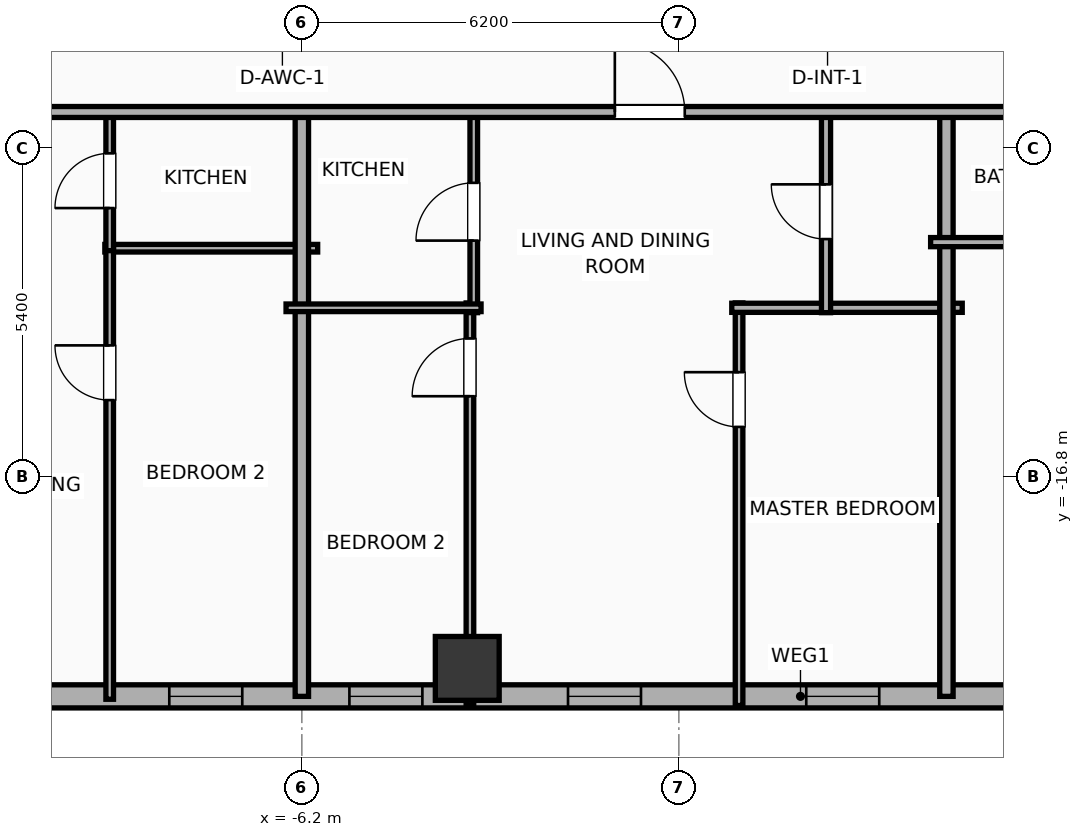
"""IFC4 building model, lengths in metres.
Left out: names, types, materials, properties, quantities, classifications, styles, units other than length and angle.
Written with IfcOpenShell. Run it as: python <this file> out.ifc"""

import sys

from ifc_helpers import new_model, si_unit, direction, frame, frame_2d, origin, origin_2d, place, context, subcontext, project, spatial, rectangle, hollow_rectangle, extrude, element, fill, save


model = new_model("IFC4")
c1 = context("Model", 3, precision=1e-05, world=origin(), true_north=direction((0.0, 1.0)))
c2 = subcontext(c1, "Body", "Model", "MODEL_VIEW")
j1 = project(units=[si_unit("LENGTHUNIT", "METRE"), si_unit("PLANEANGLEUNIT", "RADIAN")], contexts=[c1])
p1 = place(None, origin())
s1 = spatial("IfcSite", under=j1, at=p1, CompositionType="ELEMENT")
p2 = place(p1, origin())
s2 = spatial("IfcBuilding", under=s1, at=p2, CompositionType="ELEMENT")
p3 = place(p2, frame((0.0, 0.0, 132.6)))
s3 = spatial("IfcBuildingStorey", under=s2, at=p3, CompositionType="ELEMENT", Elevation=132.6)
p4 = place(p3, frame((-3.48, -19.95, 0.0), z_axis=(0.0, 0.0, 1.0), x_axis=(1.0, 0.0, 0.0)))
e1 = element("IfcColumn", 1, at=p4, inside=s3, PredefinedType="COLUMN", context=c2, shape_type="SweptSolid", body=[
    extrude(hollow_rectangle(XDim=1.05, YDim=1.05, WallThickness=0.036, at=origin_2d()), origin(), (0.0, 0.0, 1.0), 3.9),
])
p5 = place(p3, frame((29.381, -20.41, 0.0), z_axis=(0.0, 0.0, 1.0), x_axis=(-1.0, 0.0, 0.0)))
e2 = element("IfcWall", 2, at=p5, inside=s3, PredefinedType="ELEMENTEDWALL", context=c2, shape_type="SweptSolid", body=[
    extrude(rectangle(XDim=54.763, YDim=0.38, at=frame_2d((27.381, 0.0))), origin(), (0.0, 0.0, 1.0), 3.65),
])
p6 = place(p5, frame((3.995, 0.0, 0.75)))
e3 = element("IfcOpeningElement", 3, at=p6, cuts=e2, PredefinedType="OPENING", context=c2, shape_type="SweptSolid", body=[
    extrude(rectangle(XDim=2.4, YDim=2.1, at=frame_2d((1.2, 1.05))), frame((0.0, 0.2, 0.0), z_axis=(0.0, -1.0, 0.0), x_axis=(1.0, 0.0, 0.0)), (0.0, 0.0, 1.0), 0.4),
])
p7 = place(p5, frame((18.486, 0.0, 0.75)))
e4 = element("IfcOpeningElement", 4, at=p7, cuts=e2, PredefinedType="OPENING", context=c2, shape_type="SweptSolid", body=[
    extrude(rectangle(XDim=2.4, YDim=2.1, at=frame_2d((1.2, 1.05))), frame((0.0, 0.2, 0.0), z_axis=(0.0, -1.0, 0.0), x_axis=(1.0, 0.0, 0.0)), (0.0, 0.0, 1.0), 0.4),
])
p8 = place(p5, frame((46.717, 0.0, 0.75)))
e5 = element("IfcOpeningElement", 5, at=p8, cuts=e2, PredefinedType="OPENING", context=c2, shape_type="SweptSolid", body=[
    extrude(rectangle(XDim=2.4, YDim=2.1, at=frame_2d((1.2, 1.05))), frame((0.0, 0.2, 0.0), z_axis=(0.0, -1.0, 0.0), x_axis=(1.0, 0.0, 0.0)), (0.0, 0.0, 1.0), 0.4),
])
p9 = place(p5, frame((52.651, 0.0, 0.75)))
e6 = element("IfcOpeningElement", 6, at=p9, cuts=e2, PredefinedType="OPENING", context=c2, shape_type="SweptSolid", body=[
    extrude(rectangle(XDim=1.2, YDim=2.05, at=frame_2d((0.6, 1.025))), frame((0.0, 0.2, 0.0), z_axis=(0.0, -1.0, 0.0), x_axis=(1.0, 0.0, 0.0)), (0.0, 0.0, 1.0), 0.4),
])
p10 = place(p5, frame((50.521, 0.0, 0.75)))
e7 = element("IfcOpeningElement", 7, at=p10, cuts=e2, PredefinedType="OPENING", context=c2, shape_type="SweptSolid", body=[
    extrude(rectangle(XDim=1.2, YDim=2.05, at=frame_2d((0.6, 1.025))), frame((0.0, 0.2, 0.0), z_axis=(0.0, -1.0, 0.0), x_axis=(1.0, 0.0, 0.0)), (0.0, 0.0, 1.0), 0.4),
])
p11 = place(p5, frame((40.191, 0.0, 0.75)))
e8 = element("IfcOpeningElement", 8, at=p11, cuts=e2, PredefinedType="OPENING", context=c2, shape_type="SweptSolid", body=[
    extrude(rectangle(XDim=1.2, YDim=2.05, at=frame_2d((0.6, 1.025))), frame((0.0, 0.2, 0.0), z_axis=(0.0, -1.0, 0.0), x_axis=(1.0, 0.0, 0.0)), (0.0, 0.0, 1.0), 0.4),
])
p12 = place(p5, frame((44.631, 0.0, 0.75)))
e9 = element("IfcOpeningElement", 9, at=p12, cuts=e2, PredefinedType="OPENING", context=c2, shape_type="SweptSolid", body=[
    extrude(rectangle(XDim=1.2, YDim=2.05, at=frame_2d((0.6, 1.025))), frame((0.0, 0.2, 0.0), z_axis=(0.0, -1.0, 0.0), x_axis=(1.0, 0.0, 0.0)), (0.0, 0.0, 1.0), 0.4),
])
p13 = place(p5, frame((36.561, 0.0, 0.75)))
e10 = element("IfcOpeningElement", 10, at=p13, cuts=e2, PredefinedType="OPENING", context=c2, shape_type="SweptSolid", body=[
    extrude(rectangle(XDim=1.2, YDim=2.05, at=frame_2d((0.6, 1.025))), frame((0.0, 0.2, 0.0), z_axis=(0.0, -1.0, 0.0), x_axis=(1.0, 0.0, 0.0)), (0.0, 0.0, 1.0), 0.4),
])
p14 = place(p5, frame((30.004, 0.0, 0.75)))
e11 = element("IfcOpeningElement", 11, at=p14, cuts=e2, PredefinedType="OPENING", context=c2, shape_type="SweptSolid", body=[
    extrude(rectangle(XDim=1.2, YDim=2.05, at=frame_2d((0.6, 1.025))), frame((0.0, 0.2, 0.0), z_axis=(0.0, -1.0, 0.0), x_axis=(1.0, 0.0, 0.0)), (0.0, 0.0, 1.0), 0.4),
])
p15 = place(p5, frame((33.599, 0.0, 0.75)))
e12 = element("IfcOpeningElement", 12, at=p15, cuts=e2, PredefinedType="OPENING", context=c2, shape_type="SweptSolid", body=[
    extrude(rectangle(XDim=1.2, YDim=2.05, at=frame_2d((0.6, 1.025))), frame((0.0, 0.2, 0.0), z_axis=(0.0, -1.0, 0.0), x_axis=(1.0, 0.0, 0.0)), (0.0, 0.0, 1.0), 0.4),
])
p16 = place(p5, frame((26.086, 0.0, 0.75)))
e13 = element("IfcOpeningElement", 13, at=p16, cuts=e2, PredefinedType="OPENING", context=c2, shape_type="SweptSolid", body=[
    extrude(rectangle(XDim=1.2, YDim=2.05, at=frame_2d((0.6, 1.025))), frame((0.0, 0.2, 0.0), z_axis=(0.0, -1.0, 0.0), x_axis=(1.0, 0.0, 0.0)), (0.0, 0.0, 1.0), 0.4),
])
p17 = place(p5, frame((22.626, 0.0, 0.75)))
e14 = element("IfcOpeningElement", 14, at=p17, cuts=e2, PredefinedType="OPENING", context=c2, shape_type="SweptSolid", body=[
    extrude(rectangle(XDim=1.2, YDim=2.05, at=frame_2d((0.6, 1.025))), frame((0.0, 0.2, 0.0), z_axis=(0.0, -1.0, 0.0), x_axis=(1.0, 0.0, 0.0)), (0.0, 0.0, 1.0), 0.4),
])
p18 = place(p5, frame((15.361, 0.0, 0.75)))
e15 = element("IfcOpeningElement", 15, at=p18, cuts=e2, PredefinedType="OPENING", context=c2, shape_type="SweptSolid", body=[
    extrude(rectangle(XDim=1.2, YDim=2.05, at=frame_2d((0.6, 1.025))), frame((0.0, 0.2, 0.0), z_axis=(0.0, -1.0, 0.0), x_axis=(1.0, 0.0, 0.0)), (0.0, 0.0, 1.0), 0.4),
])
p19 = place(p5, frame((8.986, 0.0, 0.75)))
e16 = element("IfcOpeningElement", 16, at=p19, cuts=e2, PredefinedType="OPENING", context=c2, shape_type="SweptSolid", body=[
    extrude(rectangle(XDim=1.2, YDim=2.05, at=frame_2d((0.6, 1.025))), frame((0.0, 0.2, 0.0), z_axis=(0.0, -1.0, 0.0), x_axis=(1.0, 0.0, 0.0)), (0.0, 0.0, 1.0), 0.4),
])
p20 = place(p5, frame((1.736, 0.0, 0.75)))
e17 = element("IfcOpeningElement", 17, at=p20, cuts=e2, PredefinedType="OPENING", context=c2, shape_type="SweptSolid", body=[
    extrude(rectangle(XDim=1.2, YDim=2.05, at=frame_2d((0.6, 1.025))), frame((0.0, 0.2, 0.0), z_axis=(0.0, -1.0, 0.0), x_axis=(1.0, 0.0, 0.0)), (0.0, 0.0, 1.0), 0.4),
])
p21 = place(p3, frame((-9.44, -13.04, 0.0), z_axis=(0.0, 0.0, 1.0), x_axis=(1.0, 0.0, 0.0)))
e18 = element("IfcWall", 18, at=p21, inside=s3, PredefinedType="PARTITIONING", context=c2, shape_type="SweptSolid", body=[
    extrude(rectangle(XDim=3.5, YDim=0.125, at=frame_2d((1.75, 0.0))), origin(), (0.0, 0.0, 1.0), 3.65),
])
p22 = place(p3, frame((-9.36, -20.458, 0.0), z_axis=(0.0, 0.0, 1.0), x_axis=(0.0, 1.0, 0.0)))
e19 = element("IfcWall", 19, at=p22, inside=s3, PredefinedType="PARTITIONING", context=c2, shape_type="SweptSolid", body=[
    extrude(rectangle(XDim=7.458, YDim=0.125, at=frame_2d((3.729, 0.0))), origin(), (0.0, 0.0, 1.0), 3.65),
])
p23 = place(p22, frame((4.919, 0.0, 0.0)))
e20 = element("IfcOpeningElement", 20, at=p23, cuts=e19, PredefinedType="OPENING", context=c2, shape_type="SweptSolid", body=[
    extrude(rectangle(XDim=0.9, YDim=2.05, at=frame_2d((0.45, 1.025))), frame((0.0, 0.073, 0.0), z_axis=(0.0, -1.0, 0.0), x_axis=(1.0, 0.0, 0.0)), (0.0, 0.0, 1.0), 0.145),
])
p24 = place(p3, frame((-9.36, -13.08, 0.0), z_axis=(0.0, 0.0, 1.0), x_axis=(0.0, 1.0, 0.0)))
e21 = element("IfcWall", 21, at=p24, inside=s3, PredefinedType="PARTITIONING", context=c2, shape_type="SweptSolid", body=[
    extrude(rectangle(XDim=2.3, YDim=0.125, at=frame_2d((1.15, 0.0))), origin(), (0.0, 0.0, 1.0), 3.65),
])
p25 = place(p24, frame((0.7, 0.0, 0.0)))
e22 = element("IfcOpeningElement", 22, at=p25, cuts=e21, PredefinedType="OPENING", context=c2, shape_type="SweptSolid", body=[
    extrude(rectangle(XDim=0.9, YDim=2.05, at=frame_2d((0.45, 1.025))), frame((0.0, 0.073, 0.0), z_axis=(0.0, -1.0, 0.0), x_axis=(1.0, 0.0, 0.0)), (0.0, 0.0, 1.0), 0.145),
])
p26 = place(p3, frame((-6.2, -20.41, 0.0), z_axis=(0.0, 0.0, 1.0), x_axis=(0.0, 1.0, 0.0)))
e23 = element("IfcWall", 23, at=p26, inside=s3, PredefinedType="PARTITIONING", context=c2, shape_type="SweptSolid", body=[
    extrude(rectangle(XDim=9.69, YDim=0.22, at=frame_2d((4.845, 0.0))), origin(), (0.0, 0.0, 1.0), 3.65),
])
p27 = place(p3, frame((-3.436, -20.56, 0.0), z_axis=(0.0, 0.0, 1.0), x_axis=(0.0, 1.0, 0.0)))
e24 = element("IfcWall", 24, at=p27, inside=s3, PredefinedType="PARTITIONING", context=c2, shape_type="SweptSolid", body=[
    extrude(rectangle(XDim=6.62, YDim=0.125, at=frame_2d((3.31, 0.0))), origin(), (0.0, 0.0, 1.0), 3.04),
])
p28 = place(p27, frame((5.086, 0.0, 0.0)))
e25 = element("IfcOpeningElement", 25, at=p28, cuts=e24, PredefinedType="OPENING", context=c2, shape_type="SweptSolid", body=[
    extrude(rectangle(XDim=0.95, YDim=2.05, at=frame_2d((0.475, 1.025))), frame((0.0, 0.073, 0.0), z_axis=(0.0, -1.0, 0.0), x_axis=(1.0, 0.0, 0.0)), (0.0, 0.0, 1.0), 0.145),
])
p29 = place(p3, frame((0.99, -20.56, 0.0), z_axis=(0.0, 0.0, 1.0), x_axis=(0.0, 1.0, 0.0)))
e26 = element("IfcWall", 26, at=p29, inside=s3, PredefinedType="PARTITIONING", context=c2, shape_type="SweptSolid", body=[
    extrude(rectangle(XDim=6.62, YDim=0.125, at=frame_2d((3.31, 0.0))), origin(), (0.0, 0.0, 1.0), 3.65),
])
p30 = place(p29, frame((4.581, 0.0, 0.0)))
e27 = element("IfcOpeningElement", 27, at=p30, cuts=e26, PredefinedType="OPENING", context=c2, shape_type="SweptSolid", body=[
    extrude(rectangle(XDim=0.9, YDim=2.05, at=frame_2d((0.45, 1.025))), frame((0.0, 0.073, 0.0), z_axis=(0.0, -1.0, 0.0), x_axis=(1.0, 0.0, 0.0)), (0.0, 0.0, 1.0), 0.145),
])
p31 = place(p3, frame((0.87, -14.02, 0.0), z_axis=(0.0, 0.0, 1.0), x_axis=(1.0, 0.0, 0.0)))
e28 = element("IfcWall", 28, at=p31, inside=s3, PredefinedType="PLUMBINGWALL", context=c2, shape_type="SweptSolid", body=[
    extrude(rectangle(XDim=3.79, YDim=0.15, at=frame_2d((1.895, 0.0))), origin(), (0.0, 0.0, 1.0), 3.65),
])
p32 = place(p3, frame((-3.373, -14.1, 0.0), z_axis=(0.0, 0.0, 1.0), x_axis=(0.0, 1.0, 0.0)))
e29 = element("IfcWall", 29, at=p32, inside=s3, PredefinedType="PARTITIONING", context=c2, shape_type="SweptSolid", body=[
    extrude(rectangle(XDim=3.32, YDim=0.125, at=frame_2d((1.66, 0.0))), origin(), (0.0, 0.0, 1.0), 3.65),
])
p33 = place(p32, frame((1.185, 0.0, 0.0)))
e30 = element("IfcOpeningElement", 30, at=p33, cuts=e29, PredefinedType="OPENING", context=c2, shape_type="SweptSolid", body=[
    extrude(rectangle(XDim=0.95, YDim=2.05, at=frame_2d((0.475, 1.025))), frame((0.0, 0.073, 0.0), z_axis=(0.0, -1.0, 0.0), x_axis=(1.0, 0.0, 0.0)), (0.0, 0.0, 1.0), 0.145),
])
p34 = place(p3, frame((-6.46, -14.02, 0.0), z_axis=(0.0, 0.0, 1.0), x_axis=(1.0, 0.0, 0.0)))
e31 = element("IfcWall", 31, at=p34, inside=s3, PredefinedType="PARTITIONING", context=c2, shape_type="SweptSolid", body=[
    extrude(rectangle(XDim=3.207, YDim=0.125, at=frame_2d((1.604, 0.0))), origin(), (0.0, 0.0, 1.0), 3.65),
])
p35 = place(p3, frame((2.42, -14.1, 0.0), z_axis=(0.0, 0.0, 1.0), x_axis=(0.0, 1.0, 0.0)))
e32 = element("IfcWall", 32, at=p35, inside=s3, PredefinedType="PLUMBINGWALL", context=c2, shape_type="SweptSolid", body=[
    extrude(rectangle(XDim=3.32, YDim=0.15, at=frame_2d((1.66, 0.0))), origin(), (0.0, 0.0, 1.0), 3.65),
])
p36 = place(p35, frame((1.21, 0.0, 0.0)))
e33 = element("IfcOpeningElement", 33, at=p36, cuts=e32, PredefinedType="OPENING", context=c2, shape_type="SweptSolid", body=[
    extrude(rectangle(XDim=0.9, YDim=2.05, at=frame_2d((0.45, 1.025))), frame((0.0, 0.085, 0.0), z_axis=(0.0, -1.0, 0.0), x_axis=(1.0, 0.0, 0.0)), (0.0, 0.0, 1.0), 0.17),
])
p37 = place(p3, frame((4.4, -20.41, 0.0), z_axis=(0.0, 0.0, 1.0), x_axis=(0.0, 1.0, 0.0)))
e34 = element("IfcWall", 34, at=p37, inside=s3, PredefinedType="PARTITIONING", context=c2, shape_type="SweptSolid", body=[
    extrude(rectangle(XDim=9.69, YDim=0.22, at=frame_2d((4.845, 0.0))), origin(), (0.0, 0.0, 1.0), 3.65),
])
p38 = place(p3, frame((4.14, -12.94, 0.0), z_axis=(0.0, 0.0, 1.0), x_axis=(1.0, 0.0, 0.0)))
e35 = element("IfcWall", 35, at=p38, inside=s3, PredefinedType="PLUMBINGWALL", context=c2, shape_type="SweptSolid", body=[
    extrude(rectangle(XDim=3.85, YDim=0.15, at=frame_2d((1.925, 0.0))), origin(), (0.0, 0.0, 1.0), 3.65),
])
p39 = place(p3, frame((-29.21, -10.8, 0.0), z_axis=(0.0, 0.0, 1.0), x_axis=(1.0, 0.0, 0.0)))
e36 = element("IfcWall", 36, at=p39, inside=s3, PredefinedType="PARTITIONING", context=c2, shape_type="SweptSolid", body=[
    extrude(rectangle(XDim=62.42, YDim=0.18, at=frame_2d((31.21, 0.0))), origin(), (0.0, 0.0, 1.0), 3.65),
])
p40 = place(p39, frame((2.74, 0.0, 0.0)))
e37 = element("IfcOpeningElement", 37, at=p40, cuts=e36, PredefinedType="OPENING", context=c2, shape_type="SweptSolid", body=[
    extrude(rectangle(XDim=0.9, YDim=2.05, at=frame_2d((0.45, 1.025))), frame((0.0, 0.1, 0.0), z_axis=(0.0, -1.0, 0.0), x_axis=(1.0, 0.0, 0.0)), (0.0, 0.0, 1.0), 0.2),
])
p41 = place(p39, frame((9.968, 0.0, 0.0)))
e38 = element("IfcOpeningElement", 38, at=p41, cuts=e36, PredefinedType="OPENING", context=c2, shape_type="SweptSolid", body=[
    extrude(rectangle(XDim=1.15, YDim=2.05, at=frame_2d((0.575, 1.025))), frame((0.0, 0.1, 0.0), z_axis=(0.0, -1.0, 0.0), x_axis=(1.0, 0.0, 0.0)), (0.0, 0.0, 1.0), 0.2),
])
p42 = place(p39, frame((17.227, 0.0, 0.0)))
e39 = element("IfcOpeningElement", 39, at=p42, cuts=e36, PredefinedType="OPENING", context=c2, shape_type="SweptSolid", body=[
    extrude(rectangle(XDim=1.15, YDim=2.05, at=frame_2d((0.575, 1.025))), frame((0.0, 0.1, 0.0), z_axis=(0.0, -1.0, 0.0), x_axis=(1.0, 0.0, 0.0)), (0.0, 0.0, 1.0), 0.2),
])
p43 = place(p39, frame((28.157, 0.0, 0.0)))
e40 = element("IfcOpeningElement", 40, at=p43, cuts=e36, PredefinedType="OPENING", context=c2, shape_type="SweptSolid", body=[
    extrude(rectangle(XDim=1.15, YDim=2.05, at=frame_2d((0.575, 1.025))), frame((0.0, 0.1, 0.0), z_axis=(0.0, -1.0, 0.0), x_axis=(1.0, 0.0, 0.0)), (0.0, 0.0, 1.0), 0.2),
])
p44 = place(p39, frame((38.512, 0.0, 0.0)))
e41 = element("IfcOpeningElement", 41, at=p44, cuts=e36, PredefinedType="OPENING", context=c2, shape_type="SweptSolid", body=[
    extrude(rectangle(XDim=1.15, YDim=2.05, at=frame_2d((0.575, 1.025))), frame((0.0, 0.1, 0.0), z_axis=(0.0, -1.0, 0.0), x_axis=(1.0, 0.0, 0.0)), (0.0, 0.0, 1.0), 0.2),
])
p45 = place(p39, frame((49.33, 0.0, 0.0)))
e42 = element("IfcOpeningElement", 42, at=p45, cuts=e36, PredefinedType="OPENING", context=c2, shape_type="SweptSolid", body=[
    extrude(rectangle(XDim=1.15, YDim=2.05, at=frame_2d((0.575, 1.025))), frame((0.0, 0.1, 0.0), z_axis=(0.0, -1.0, 0.0), x_axis=(1.0, 0.0, 0.0)), (0.0, 0.0, 1.0), 0.2),
])
p46 = place(p39, frame((58.237, 0.0, 0.0)))
e43 = element("IfcOpeningElement", 43, at=p46, cuts=e36, PredefinedType="OPENING", context=c2, shape_type="SweptSolid", body=[
    extrude(rectangle(XDim=1.15, YDim=2.05, at=frame_2d((0.575, 1.025))), frame((0.0, 0.1, 0.0), z_axis=(0.0, -1.0, 0.0), x_axis=(1.0, 0.0, 0.0)), (0.0, 0.0, 1.0), 0.2),
])
p47 = place(p13, origin())
e44 = element("IfcWindow", 44, at=p47, inside=s3, PartitioningType="SINGLE_PANEL", PredefinedType="WINDOW", context=c2, shape_type="SweptSolid", body=[
    extrude(rectangle(XDim=1.2, YDim=2.05, at=frame_2d((0.6, 1.025))), frame((0.0, 0.03, 0.0), z_axis=(0.0, -1.0, 0.0), x_axis=(1.0, 0.0, 0.0)), (0.0, 0.0, 1.0), 0.06),
])
fill(e10, e44)
p48 = place(p14, origin())
e45 = element("IfcWindow", 45, at=p48, inside=s3, PartitioningType="SINGLE_PANEL", PredefinedType="WINDOW", context=c2, shape_type="SweptSolid", body=[
    extrude(rectangle(XDim=1.2, YDim=2.05, at=frame_2d((0.6, 1.025))), frame((0.0, 0.03, 0.0), z_axis=(0.0, -1.0, 0.0), x_axis=(1.0, 0.0, 0.0)), (0.0, 0.0, 1.0), 0.06),
])
fill(e11, e45)
p49 = place(p15, origin())
e46 = element("IfcWindow", 46, at=p49, inside=s3, PartitioningType="SINGLE_PANEL", PredefinedType="WINDOW", context=c2, shape_type="SweptSolid", body=[
    extrude(rectangle(XDim=1.2, YDim=2.05, at=frame_2d((0.6, 1.025))), frame((0.0, 0.03, 0.0), z_axis=(0.0, -1.0, 0.0), x_axis=(1.0, 0.0, 0.0)), (0.0, 0.0, 1.0), 0.06),
])
fill(e12, e46)
p50 = place(p16, origin())
e47 = element("IfcWindow", 47, at=p50, inside=s3, PartitioningType="SINGLE_PANEL", PredefinedType="WINDOW", context=c2, shape_type="SweptSolid", body=[
    extrude(rectangle(XDim=1.2, YDim=2.05, at=frame_2d((0.6, 1.025))), frame((0.0, 0.03, 0.0), z_axis=(0.0, -1.0, 0.0), x_axis=(1.0, 0.0, 0.0)), (0.0, 0.0, 1.0), 0.06),
])
fill(e13, e47)
p51 = place(p23, origin())
e48 = element("IfcDoor", 48, at=p51, inside=s3, OperationType="SINGLE_SWING_RIGHT", PredefinedType="DOOR", context=c2, shape_type="SweptSolid", body=[
    extrude(rectangle(XDim=0.9, YDim=2.05, at=frame_2d((0.45, 1.025))), frame((0.0, 0.025, 0.0), z_axis=(0.0, -1.0, 0.0), x_axis=(1.0, 0.0, 0.0)), (0.0, 0.0, 1.0), 0.05),
])
fill(e20, e48)
p52 = place(p25, origin())
e49 = element("IfcDoor", 49, at=p52, inside=s3, OperationType="SINGLE_SWING_LEFT", PredefinedType="DOOR", context=c2, shape_type="SweptSolid", body=[
    extrude(rectangle(XDim=0.9, YDim=2.05, at=frame_2d((0.45, 1.025))), frame((0.0, 0.025, 0.0), z_axis=(0.0, -1.0, 0.0), x_axis=(1.0, 0.0, 0.0)), (0.0, 0.0, 1.0), 0.05),
])
fill(e22, e49)
p53 = place(p28, origin())
e50 = element("IfcDoor", 50, at=p53, inside=s3, OperationType="SINGLE_SWING_LEFT", PredefinedType="DOOR", context=c2, shape_type="SweptSolid", body=[
    extrude(rectangle(XDim=0.95, YDim=2.05, at=frame_2d((0.475, 1.025))), frame((0.0, 0.025, 0.0), z_axis=(0.0, -1.0, 0.0), x_axis=(1.0, 0.0, 0.0)), (0.0, 0.0, 1.0), 0.05),
])
fill(e25, e50)
p54 = place(p30, origin())
e51 = element("IfcDoor", 51, at=p54, inside=s3, OperationType="SINGLE_SWING_RIGHT", PredefinedType="DOOR", context=c2, shape_type="SweptSolid", body=[
    extrude(rectangle(XDim=0.9, YDim=2.05, at=frame_2d((0.45, 1.025))), frame((0.0, 0.025, 0.0), z_axis=(0.0, -1.0, 0.0), x_axis=(1.0, 0.0, 0.0)), (0.0, 0.0, 1.0), 0.05),
])
fill(e27, e51)
p55 = place(p33, origin())
e52 = element("IfcDoor", 52, at=p55, inside=s3, OperationType="SINGLE_SWING_LEFT", PredefinedType="DOOR", context=c2, shape_type="SweptSolid", body=[
    extrude(rectangle(XDim=0.95, YDim=2.05, at=frame_2d((0.475, 1.025))), frame((0.0, 0.025, 0.0), z_axis=(0.0, -1.0, 0.0), x_axis=(1.0, 0.0, 0.0)), (0.0, 0.0, 1.0), 0.05),
])
fill(e30, e52)
p56 = place(p36, origin())
e53 = element("IfcDoor", 53, at=p56, inside=s3, OperationType="SINGLE_SWING_RIGHT", PredefinedType="DOOR", context=c2, shape_type="SweptSolid", body=[
    extrude(rectangle(XDim=0.9, YDim=2.05, at=frame_2d((0.45, 1.025))), frame((0.0, 0.025, 0.0), z_axis=(0.0, -1.0, 0.0), x_axis=(1.0, 0.0, 0.0)), (0.0, 0.0, 1.0), 0.05),
])
fill(e33, e53)
p57 = place(p43, origin())
e54 = element("IfcDoor", 54, at=p57, inside=s3, OperationType="SINGLE_SWING_LEFT", PredefinedType="DOOR", context=c2, shape_type="SweptSolid", body=[
    extrude(rectangle(XDim=1.15, YDim=2.05, at=frame_2d((0.575, 1.025))), frame((0.0, 0.025, 0.0), z_axis=(0.0, -1.0, 0.0), x_axis=(1.0, 0.0, 0.0)), (0.0, 0.0, 1.0), 0.05),
])
fill(e40, e54)
save(model, sys.argv[1])
